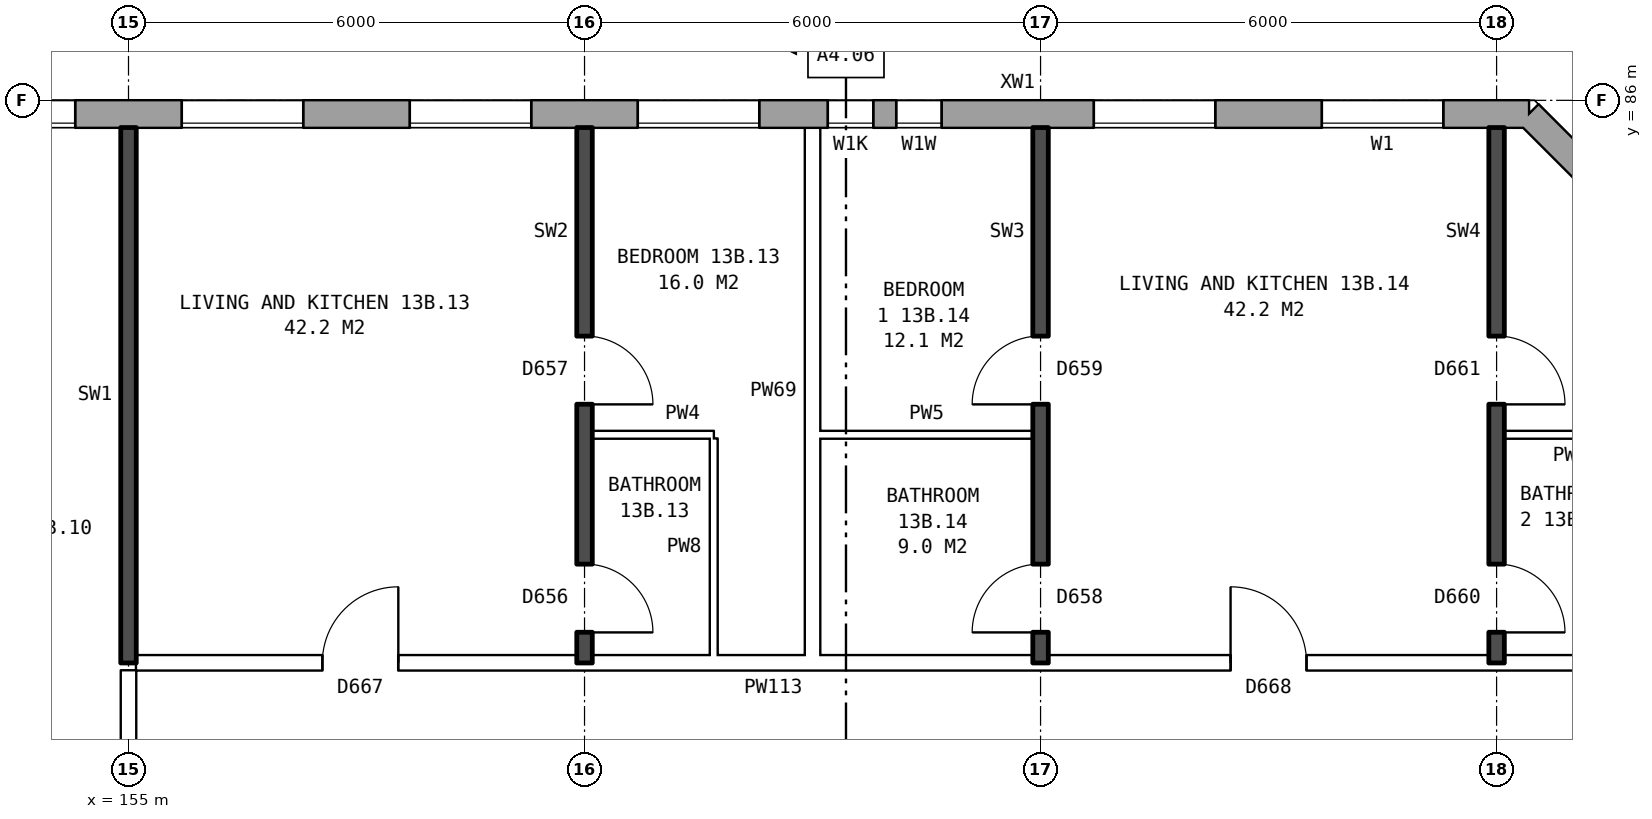
"""IFC4 building model, lengths in metres.
Left out: names, types, materials, properties, quantities, classifications, styles, units other than length and angle.
Written with IfcOpenShell. Run it as: python <this file> out.ifc"""

import sys

from ifc_helpers import new_model, si_unit, direction, frame, frame_2d, origin, place, context, subcontext, project, spatial, rectangle, extrude, element, fill, save


model = new_model("IFC4")
c1 = context("Model", 3, precision=1e-05, world=origin(), true_north=direction((0.0, 1.0)))
c2 = subcontext(c1, "Body", "Model", "MODEL_VIEW")
j1 = project(units=[si_unit("LENGTHUNIT", "METRE"), si_unit("PLANEANGLEUNIT", "RADIAN")], contexts=[c1])
p1 = place(None, origin())
s1 = spatial("IfcSite", under=j1, at=p1, CompositionType="ELEMENT")
p2 = place(p1, origin())
s2 = spatial("IfcBuilding", under=s1, at=p2, CompositionType="ELEMENT")
p3 = place(p2, frame((0.0, 0.0, 50.5)))
s3 = spatial("IfcBuildingStorey", under=s2, at=p3, CompositionType="ELEMENT", Elevation=50.5)
p4 = place(p3, frame((176.32, 82.925, 0.0), z_axis=(0.0, 0.0, 1.0), x_axis=(-0.707106781187, 0.707106781187, 0.0)))
e1 = element("IfcWall", 1, at=p4, inside=s3, PredefinedType="STANDARD", context=c2, shape_type="SweptSolid", body=[
    extrude(rectangle(XDim=4.094, YDim=0.36, at=frame_2d((2.047, 0.0))), origin(), (0.0, 0.0, 1.0), 2.85),
])
p5 = place(p4, frame((1.247, 0.0, 0.8)))
e2 = element("IfcOpeningElement", 2, at=p5, cuts=e1, PredefinedType="OPENING", context=c2, shape_type="SweptSolid", body=[
    extrude(rectangle(XDim=1.6, YDim=1.8, at=frame_2d((0.8, 0.9))), frame((0.0, 0.19, 0.0), z_axis=(0.0, -1.0, 0.0), x_axis=(1.0, 0.0, 0.0)), (0.0, 0.0, 1.0), 0.38),
])
p6 = place(p3, frame((173.425, 85.82, 0.0), z_axis=(0.0, 0.0, 1.0), x_axis=(-1.0, 0.0, 0.0)))
e3 = element("IfcWall", 3, at=p6, inside=s3, PredefinedType="STANDARD", context=c2, shape_type="SweptSolid", body=[
    extrude(rectangle(XDim=39.351, YDim=0.36, at=frame_2d((19.675, 0.0))), origin(), (0.0, 0.0, 1.0), 2.85),
])
p7 = place(p6, frame((1.125, 0.0, 0.8)))
e4 = element("IfcOpeningElement", 4, at=p7, cuts=e3, PredefinedType="OPENING", context=c2, shape_type="SweptSolid", body=[
    extrude(rectangle(XDim=1.6, YDim=1.8, at=frame_2d((0.8, 0.9))), frame((0.0, 0.19, 0.0), z_axis=(0.0, -1.0, 0.0), x_axis=(1.0, 0.0, 0.0)), (0.0, 0.0, 1.0), 0.38),
])
p8 = place(p6, frame((4.125, 0.0, 0.8)))
e5 = element("IfcOpeningElement", 5, at=p8, cuts=e3, PredefinedType="OPENING", context=c2, shape_type="SweptSolid", body=[
    extrude(rectangle(XDim=1.6, YDim=1.8, at=frame_2d((0.8, 0.9))), frame((0.0, 0.19, 0.0), z_axis=(0.0, -1.0, 0.0), x_axis=(1.0, 0.0, 0.0)), (0.0, 0.0, 1.0), 0.38),
])
p9 = place(p6, frame((7.725, 0.0, 0.8)))
e6 = element("IfcOpeningElement", 6, at=p9, cuts=e3, PredefinedType="OPENING", context=c2, shape_type="SweptSolid", body=[
    extrude(rectangle(XDim=0.6, YDim=0.9, at=frame_2d((0.3, 0.45))), frame((0.0, 0.19, 0.0), z_axis=(0.0, -1.0, 0.0), x_axis=(1.0, 0.0, 0.0)), (0.0, 0.0, 1.0), 0.38),
])
p10 = place(p6, frame((10.125, 0.0, 0.8)))
e7 = element("IfcOpeningElement", 7, at=p10, cuts=e3, PredefinedType="OPENING", context=c2, shape_type="SweptSolid", body=[
    extrude(rectangle(XDim=1.6, YDim=1.8, at=frame_2d((0.8, 0.9))), frame((0.0, 0.19, 0.0), z_axis=(0.0, -1.0, 0.0), x_axis=(1.0, 0.0, 0.0)), (0.0, 0.0, 1.0), 0.38),
])
p11 = place(p6, frame((13.125, 0.0, 0.8)))
e8 = element("IfcOpeningElement", 8, at=p11, cuts=e3, PredefinedType="OPENING", context=c2, shape_type="SweptSolid", body=[
    extrude(rectangle(XDim=1.6, YDim=1.8, at=frame_2d((0.8, 0.9))), frame((0.0, 0.19, 0.0), z_axis=(0.0, -1.0, 0.0), x_axis=(1.0, 0.0, 0.0)), (0.0, 0.0, 1.0), 0.38),
])
p12 = place(p6, frame((16.125, 0.0, 0.8)))
e9 = element("IfcOpeningElement", 9, at=p12, cuts=e3, PredefinedType="OPENING", context=c2, shape_type="SweptSolid", body=[
    extrude(rectangle(XDim=1.6, YDim=1.8, at=frame_2d((0.8, 0.9))), frame((0.0, 0.19, 0.0), z_axis=(0.0, -1.0, 0.0), x_axis=(1.0, 0.0, 0.0)), (0.0, 0.0, 1.0), 0.38),
])
p13 = place(p6, frame((19.125, 0.0, 0.8)))
e10 = element("IfcOpeningElement", 10, at=p13, cuts=e3, PredefinedType="OPENING", context=c2, shape_type="SweptSolid", body=[
    extrude(rectangle(XDim=1.6, YDim=1.8, at=frame_2d((0.8, 0.9))), frame((0.0, 0.19, 0.0), z_axis=(0.0, -1.0, 0.0), x_axis=(1.0, 0.0, 0.0)), (0.0, 0.0, 1.0), 0.38),
])
p14 = place(p6, frame((22.125, 0.0, 0.8)))
e11 = element("IfcOpeningElement", 11, at=p14, cuts=e3, PredefinedType="OPENING", context=c2, shape_type="SweptSolid", body=[
    extrude(rectangle(XDim=1.6, YDim=1.8, at=frame_2d((0.8, 0.9))), frame((0.0, 0.19, 0.0), z_axis=(0.0, -1.0, 0.0), x_axis=(1.0, 0.0, 0.0)), (0.0, 0.0, 1.0), 0.38),
])
p15 = place(p6, frame((25.125, 0.0, 0.8)))
e12 = element("IfcOpeningElement", 12, at=p15, cuts=e3, PredefinedType="OPENING", context=c2, shape_type="SweptSolid", body=[
    extrude(rectangle(XDim=1.6, YDim=1.8, at=frame_2d((0.8, 0.9))), frame((0.0, 0.19, 0.0), z_axis=(0.0, -1.0, 0.0), x_axis=(1.0, 0.0, 0.0)), (0.0, 0.0, 1.0), 0.38),
])
p16 = place(p6, frame((28.125, 0.0, 0.8)))
e13 = element("IfcOpeningElement", 13, at=p16, cuts=e3, PredefinedType="OPENING", context=c2, shape_type="SweptSolid", body=[
    extrude(rectangle(XDim=1.6, YDim=1.8, at=frame_2d((0.8, 0.9))), frame((0.0, 0.19, 0.0), z_axis=(0.0, -1.0, 0.0), x_axis=(1.0, 0.0, 0.0)), (0.0, 0.0, 1.0), 0.38),
])
p17 = place(p6, frame((30.625, 0.0, 0.8)))
e14 = element("IfcOpeningElement", 14, at=p17, cuts=e3, PredefinedType="OPENING", context=c2, shape_type="SweptSolid", body=[
    extrude(rectangle(XDim=1.0, YDim=0.9, at=frame_2d((0.5, 0.45))), frame((0.0, 0.19, 0.0), z_axis=(0.0, -1.0, 0.0), x_axis=(1.0, 0.0, 0.0)), (0.0, 0.0, 1.0), 0.38),
])
p18 = place(p6, frame((34.125, 0.0, 0.8)))
e15 = element("IfcOpeningElement", 15, at=p18, cuts=e3, PredefinedType="OPENING", context=c2, shape_type="SweptSolid", body=[
    extrude(rectangle(XDim=1.6, YDim=1.8, at=frame_2d((0.8, 0.9))), frame((0.0, 0.19, 0.0), z_axis=(0.0, -1.0, 0.0), x_axis=(1.0, 0.0, 0.0)), (0.0, 0.0, 1.0), 0.38),
])
p19 = place(p6, frame((37.125, 0.0, 0.8)))
e16 = element("IfcOpeningElement", 16, at=p19, cuts=e3, PredefinedType="OPENING", context=c2, shape_type="SweptSolid", body=[
    extrude(rectangle(XDim=1.6, YDim=1.8, at=frame_2d((0.8, 0.9))), frame((0.0, 0.19, 0.0), z_axis=(0.0, -1.0, 0.0), x_axis=(1.0, 0.0, 0.0)), (0.0, 0.0, 1.0), 0.38),
])
p20 = place(p6, frame((8.625, 0.0, 0.8)))
e17 = element("IfcOpeningElement", 17, at=p20, cuts=e3, PredefinedType="OPENING", context=c2, shape_type="SweptSolid", body=[
    extrude(rectangle(XDim=0.6, YDim=1.5, at=frame_2d((0.3, 0.75))), frame((0.0, 0.19, 0.0), z_axis=(0.0, -1.0, 0.0), x_axis=(1.0, 0.0, 0.0)), (0.0, 0.0, 1.0), 0.38),
])
p21 = place(p6, frame((32.875, 0.0, 1.7)))
e18 = element("IfcOpeningElement", 18, at=p21, cuts=e3, PredefinedType="OPENING", context=c2, shape_type="SweptSolid", body=[
    extrude(rectangle(XDim=0.8, YDim=0.9, at=frame_2d((0.4, 0.45))), frame((0.0, 0.19, 0.0), z_axis=(0.0, -1.0, 0.0), x_axis=(1.0, 0.0, 0.0)), (0.0, 0.0, 1.0), 0.38),
])
p22 = place(p3, frame((155.1, 78.6, 0.0), z_axis=(0.0, 0.0, 1.0), x_axis=(1.0, 0.0, 0.0)))
e19 = element("IfcWall", 19, at=p22, inside=s3, PredefinedType="PARTITIONING", context=c2, shape_type="SweptSolid", body=[
    extrude(rectangle(XDim=21.04, YDim=0.2, at=frame_2d((10.52, 0.0))), origin(), (0.0, 0.0, 1.0), 2.85),
])
p23 = place(p22, frame((2.45, 0.0, 0.0)))
e20 = element("IfcOpeningElement", 20, at=p23, cuts=e19, PredefinedType="OPENING", context=c2, shape_type="SweptSolid", body=[
    extrude(rectangle(XDim=1.0, YDim=2.1, at=frame_2d((0.5, 1.05))), frame((0.0, 0.11, 0.0), z_axis=(0.0, -1.0, 0.0), x_axis=(1.0, 0.0, 0.0)), (0.0, 0.0, 1.0), 0.22),
])
p24 = place(p22, frame((14.4, 0.0, 0.0)))
e21 = element("IfcOpeningElement", 21, at=p24, cuts=e19, PredefinedType="OPENING", context=c2, shape_type="SweptSolid", body=[
    extrude(rectangle(XDim=1.0, YDim=2.1, at=frame_2d((0.5, 1.05))), frame((0.0, 0.11, 0.0), z_axis=(0.0, -1.0, 0.0), x_axis=(1.0, 0.0, 0.0)), (0.0, 0.0, 1.0), 0.22),
])
p25 = place(p3, frame((161.1, 81.6, 0.0), z_axis=(0.0, 0.0, 1.0), x_axis=(1.0, 0.0, 0.0)))
e22 = element("IfcWall", 22, at=p25, inside=s3, PredefinedType="PARTITIONING", context=c2, shape_type="SweptSolid", body=[
    extrude(rectangle(XDim=1.6, YDim=0.1, at=frame_2d((0.8, 0.0))), origin(), (0.0, 0.0, 1.0), 2.85),
])
p26 = place(p3, frame((164.1, 81.6, 0.0), z_axis=(0.0, 0.0, 1.0), x_axis=(1.0, 0.0, 0.0)))
e23 = element("IfcWall", 23, at=p26, inside=s3, PredefinedType="PARTITIONING", context=c2, shape_type="SweptSolid", body=[
    extrude(rectangle(XDim=2.8, YDim=0.1, at=frame_2d((1.4, 0.0))), origin(), (0.0, 0.0, 1.0), 2.85),
])
p27 = place(p3, frame((173.1, 81.6, 0.0), z_axis=(0.0, 0.0, 1.0), x_axis=(1.0, 0.0, 0.0)))
e24 = element("IfcWall", 24, at=p27, inside=s3, PredefinedType="PARTITIONING", context=c2, shape_type="SweptSolid", body=[
    extrude(rectangle(XDim=1.74, YDim=0.1, at=frame_2d((0.87, 0.0))), origin(), (0.0, 0.0, 1.0), 2.85),
])
p28 = place(p3, frame((155.0, 76.3, 0.0), z_axis=(0.0, 0.0, 1.0), x_axis=(0.0, 1.0, 0.0)))
e25 = element("IfcWall", 25, at=p28, inside=s3, PredefinedType="PARTITIONING", context=c2, shape_type="SweptSolid", body=[
    extrude(rectangle(XDim=2.2, YDim=0.2, at=frame_2d((1.1, 0.0))), origin(), (0.0, 0.0, 1.0), 2.85),
])
p29 = place(p3, frame((155.0, 78.6, 0.0), z_axis=(0.0, 0.0, 1.0), x_axis=(0.0, 1.0, 0.0)))
e26 = element("IfcWall", 26, at=p29, inside=s3, PredefinedType="SOLIDWALL", context=c2, shape_type="SweptSolid", body=[
    extrude(rectangle(XDim=7.04, YDim=0.2, at=frame_2d((3.52, 0.0))), origin(), (0.0, 0.0, 1.0), 2.85),
])
p30 = place(p3, frame((161.0, 78.6, 0.0), z_axis=(0.0, 0.0, 1.0), x_axis=(0.0, 1.0, 0.0)))
e27 = element("IfcWall", 27, at=p30, inside=s3, PredefinedType="SOLIDWALL", context=c2, shape_type="SweptSolid", body=[
    extrude(rectangle(XDim=7.04, YDim=0.2, at=frame_2d((3.52, 0.0))), origin(), (0.0, 0.0, 1.0), 2.85),
])
p31 = place(p30, frame((3.4, 0.0, 0.0)))
e28 = element("IfcOpeningElement", 28, at=p31, cuts=e27, PredefinedType="OPENING", context=c2, shape_type="SweptSolid", body=[
    extrude(rectangle(XDim=0.9, YDim=2.1, at=frame_2d((0.45, 1.05))), frame((0.0, 0.11, 0.0), z_axis=(0.0, -1.0, 0.0), x_axis=(1.0, 0.0, 0.0)), (0.0, 0.0, 1.0), 0.22),
])
p32 = place(p30, frame((0.4, 0.0, 0.0)))
e29 = element("IfcOpeningElement", 29, at=p32, cuts=e27, PredefinedType="OPENING", context=c2, shape_type="SweptSolid", body=[
    extrude(rectangle(XDim=0.9, YDim=2.1, at=frame_2d((0.45, 1.05))), frame((0.0, 0.11, 0.0), z_axis=(0.0, -1.0, 0.0), x_axis=(1.0, 0.0, 0.0)), (0.0, 0.0, 1.0), 0.22),
])
p33 = place(p3, frame((162.7, 78.7, 0.0), z_axis=(0.0, 0.0, 1.0), x_axis=(0.0, 1.0, 0.0)))
e30 = element("IfcWall", 30, at=p33, inside=s3, PredefinedType="PARTITIONING", context=c2, shape_type="SweptSolid", body=[
    extrude(rectangle(XDim=2.85, YDim=0.1, at=frame_2d((1.425, 0.0))), origin(), (0.0, 0.0, 1.0), 2.85),
])
p34 = place(p3, frame((164.0, 78.7, 0.0), z_axis=(0.0, 0.0, 1.0), x_axis=(0.0, 1.0, 0.0)))
e31 = element("IfcWall", 31, at=p34, inside=s3, PredefinedType="PARTITIONING", context=c2, shape_type="SweptSolid", body=[
    extrude(rectangle(XDim=6.94, YDim=0.2, at=frame_2d((3.47, 0.0))), origin(), (0.0, 0.0, 1.0), 2.85),
])
p35 = place(p3, frame((167.0, 78.6, 0.0), z_axis=(0.0, 0.0, 1.0), x_axis=(0.0, 1.0, 0.0)))
e32 = element("IfcWall", 32, at=p35, inside=s3, PredefinedType="SOLIDWALL", context=c2, shape_type="SweptSolid", body=[
    extrude(rectangle(XDim=7.04, YDim=0.2, at=frame_2d((3.52, 0.0))), origin(), (0.0, 0.0, 1.0), 2.85),
])
p36 = place(p35, frame((3.4, 0.0, 0.0)))
e33 = element("IfcOpeningElement", 33, at=p36, cuts=e32, PredefinedType="OPENING", context=c2, shape_type="SweptSolid", body=[
    extrude(rectangle(XDim=0.9, YDim=2.1, at=frame_2d((0.45, 1.05))), frame((0.0, 0.11, 0.0), z_axis=(0.0, -1.0, 0.0), x_axis=(1.0, 0.0, 0.0)), (0.0, 0.0, 1.0), 0.22),
])
p37 = place(p35, frame((0.4, 0.0, 0.0)))
e34 = element("IfcOpeningElement", 34, at=p37, cuts=e32, PredefinedType="OPENING", context=c2, shape_type="SweptSolid", body=[
    extrude(rectangle(XDim=0.9, YDim=2.1, at=frame_2d((0.45, 1.05))), frame((0.0, 0.11, 0.0), z_axis=(0.0, -1.0, 0.0), x_axis=(1.0, 0.0, 0.0)), (0.0, 0.0, 1.0), 0.22),
])
p38 = place(p3, frame((173.0, 78.6, 0.0), z_axis=(0.0, 0.0, 1.0), x_axis=(0.0, 1.0, 0.0)))
e35 = element("IfcWall", 35, at=p38, inside=s3, PredefinedType="SOLIDWALL", context=c2, shape_type="SweptSolid", body=[
    extrude(rectangle(XDim=7.04, YDim=0.2, at=frame_2d((3.52, 0.0))), origin(), (0.0, 0.0, 1.0), 2.85),
])
p39 = place(p38, frame((3.4, 0.0, 0.0)))
e36 = element("IfcOpeningElement", 36, at=p39, cuts=e35, PredefinedType="OPENING", context=c2, shape_type="SweptSolid", body=[
    extrude(rectangle(XDim=0.9, YDim=2.1, at=frame_2d((0.45, 1.05))), frame((0.0, 0.11, 0.0), z_axis=(0.0, -1.0, 0.0), x_axis=(1.0, 0.0, 0.0)), (0.0, 0.0, 1.0), 0.22),
])
p40 = place(p38, frame((0.4, 0.0, 0.0)))
e37 = element("IfcOpeningElement", 37, at=p40, cuts=e35, PredefinedType="OPENING", context=c2, shape_type="SweptSolid", body=[
    extrude(rectangle(XDim=0.9, YDim=2.1, at=frame_2d((0.45, 1.05))), frame((0.0, 0.11, 0.0), z_axis=(0.0, -1.0, 0.0), x_axis=(1.0, 0.0, 0.0)), (0.0, 0.0, 1.0), 0.22),
])
p41 = place(p7, origin())
e38 = element("IfcWindow", 38, at=p41, inside=s3, PartitioningType="SINGLE_PANEL", PredefinedType="WINDOW", context=c2, shape_type="SweptSolid", body=[
    extrude(rectangle(XDim=1.6, YDim=1.8, at=frame_2d((0.8, 0.9))), frame((0.0, 0.15, 0.0), z_axis=(0.0, -1.0, 0.0), x_axis=(1.0, 0.0, 0.0)), (0.0, 0.0, 1.0), 0.06),
])
fill(e4, e38)
p42 = place(p8, origin())
e39 = element("IfcWindow", 39, at=p42, inside=s3, PartitioningType="SINGLE_PANEL", PredefinedType="WINDOW", context=c2, shape_type="SweptSolid", body=[
    extrude(rectangle(XDim=1.6, YDim=1.8, at=frame_2d((0.8, 0.9))), frame((0.0, 0.15, 0.0), z_axis=(0.0, -1.0, 0.0), x_axis=(1.0, 0.0, 0.0)), (0.0, 0.0, 1.0), 0.06),
])
fill(e5, e39)
p43 = place(p9, origin())
e40 = element("IfcWindow", 40, at=p43, inside=s3, PartitioningType="SINGLE_PANEL", PredefinedType="WINDOW", context=c2, shape_type="SweptSolid", body=[
    extrude(rectangle(XDim=0.6, YDim=0.9, at=frame_2d((0.3, 0.45))), frame((0.0, 0.15, 0.0), z_axis=(0.0, -1.0, 0.0), x_axis=(1.0, 0.0, 0.0)), (0.0, 0.0, 1.0), 0.06),
])
fill(e6, e40)
p44 = place(p10, origin())
e41 = element("IfcWindow", 41, at=p44, inside=s3, PartitioningType="SINGLE_PANEL", PredefinedType="WINDOW", context=c2, shape_type="SweptSolid", body=[
    extrude(rectangle(XDim=1.6, YDim=1.8, at=frame_2d((0.8, 0.9))), frame((0.0, 0.15, 0.0), z_axis=(0.0, -1.0, 0.0), x_axis=(1.0, 0.0, 0.0)), (0.0, 0.0, 1.0), 0.06),
])
fill(e7, e41)
p45 = place(p11, origin())
e42 = element("IfcWindow", 42, at=p45, inside=s3, PartitioningType="SINGLE_PANEL", PredefinedType="WINDOW", context=c2, shape_type="SweptSolid", body=[
    extrude(rectangle(XDim=1.6, YDim=1.8, at=frame_2d((0.8, 0.9))), frame((0.0, 0.15, 0.0), z_axis=(0.0, -1.0, 0.0), x_axis=(1.0, 0.0, 0.0)), (0.0, 0.0, 1.0), 0.06),
])
fill(e8, e42)
p46 = place(p12, origin())
e43 = element("IfcWindow", 43, at=p46, inside=s3, PartitioningType="SINGLE_PANEL", PredefinedType="WINDOW", context=c2, shape_type="SweptSolid", body=[
    extrude(rectangle(XDim=1.6, YDim=1.8, at=frame_2d((0.8, 0.9))), frame((0.0, 0.15, 0.0), z_axis=(0.0, -1.0, 0.0), x_axis=(1.0, 0.0, 0.0)), (0.0, 0.0, 1.0), 0.06),
])
fill(e9, e43)
p47 = place(p13, origin())
e44 = element("IfcWindow", 44, at=p47, inside=s3, PartitioningType="SINGLE_PANEL", PredefinedType="WINDOW", context=c2, shape_type="SweptSolid", body=[
    extrude(rectangle(XDim=1.6, YDim=1.8, at=frame_2d((0.8, 0.9))), frame((0.0, 0.15, 0.0), z_axis=(0.0, -1.0, 0.0), x_axis=(1.0, 0.0, 0.0)), (0.0, 0.0, 1.0), 0.06),
])
fill(e10, e44)
p48 = place(p31, frame((0.9, 0.0, 0.0), z_axis=(0.0, 0.0, 1.0), x_axis=(-1.0, 0.0, 0.0)))
e45 = element("IfcDoor", 45, at=p48, inside=s3, OperationType="SINGLE_SWING_RIGHT", PredefinedType="DOOR", context=c2, shape_type="SweptSolid", body=[
    extrude(rectangle(XDim=0.9, YDim=2.1, at=frame_2d((0.45, 1.05))), frame((0.0, 0.025, 0.0), z_axis=(0.0, -1.0, 0.0), x_axis=(1.0, 0.0, 0.0)), (0.0, 0.0, 1.0), 0.05),
])
fill(e28, e45)
p49 = place(p23, origin())
e46 = element("IfcDoor", 46, at=p49, inside=s3, OperationType="SINGLE_SWING_RIGHT", PredefinedType="DOOR", context=c2, shape_type="SweptSolid", body=[
    extrude(rectangle(XDim=1.0, YDim=2.1, at=frame_2d((0.5, 1.05))), frame((0.0, 0.025, 0.0), z_axis=(0.0, -1.0, 0.0), x_axis=(1.0, 0.0, 0.0)), (0.0, 0.0, 1.0), 0.05),
])
fill(e20, e46)
p50 = place(p32, frame((0.9, 0.0, 0.0), z_axis=(0.0, 0.0, 1.0), x_axis=(-1.0, 0.0, 0.0)))
e47 = element("IfcDoor", 47, at=p50, inside=s3, OperationType="SINGLE_SWING_RIGHT", PredefinedType="DOOR", context=c2, shape_type="SweptSolid", body=[
    extrude(rectangle(XDim=0.9, YDim=2.1, at=frame_2d((0.45, 1.05))), frame((0.0, 0.025, 0.0), z_axis=(0.0, -1.0, 0.0), x_axis=(1.0, 0.0, 0.0)), (0.0, 0.0, 1.0), 0.05),
])
fill(e29, e47)
p51 = place(p36, origin())
e48 = element("IfcDoor", 48, at=p51, inside=s3, OperationType="SINGLE_SWING_LEFT", PredefinedType="DOOR", context=c2, shape_type="SweptSolid", body=[
    extrude(rectangle(XDim=0.9, YDim=2.1, at=frame_2d((0.45, 1.05))), frame((0.0, 0.025, 0.0), z_axis=(0.0, -1.0, 0.0), x_axis=(1.0, 0.0, 0.0)), (0.0, 0.0, 1.0), 0.05),
])
fill(e33, e48)
p52 = place(p39, frame((0.9, 0.0, 0.0), z_axis=(0.0, 0.0, 1.0), x_axis=(-1.0, 0.0, 0.0)))
e49 = element("IfcDoor", 49, at=p52, inside=s3, OperationType="SINGLE_SWING_RIGHT", PredefinedType="DOOR", context=c2, shape_type="SweptSolid", body=[
    extrude(rectangle(XDim=0.9, YDim=2.1, at=frame_2d((0.45, 1.05))), frame((0.0, 0.025, 0.0), z_axis=(0.0, -1.0, 0.0), x_axis=(1.0, 0.0, 0.0)), (0.0, 0.0, 1.0), 0.05),
])
fill(e36, e49)
p53 = place(p24, origin())
e50 = element("IfcDoor", 50, at=p53, inside=s3, OperationType="SINGLE_SWING_LEFT", PredefinedType="DOOR", context=c2, shape_type="SweptSolid", body=[
    extrude(rectangle(XDim=1.0, YDim=2.1, at=frame_2d((0.5, 1.05))), frame((0.0, 0.025, 0.0), z_axis=(0.0, -1.0, 0.0), x_axis=(1.0, 0.0, 0.0)), (0.0, 0.0, 1.0), 0.05),
])
fill(e21, e50)
p54 = place(p37, origin())
e51 = element("IfcDoor", 51, at=p54, inside=s3, OperationType="SINGLE_SWING_LEFT", PredefinedType="DOOR", context=c2, shape_type="SweptSolid", body=[
    extrude(rectangle(XDim=0.9, YDim=2.1, at=frame_2d((0.45, 1.05))), frame((0.0, 0.025, 0.0), z_axis=(0.0, -1.0, 0.0), x_axis=(1.0, 0.0, 0.0)), (0.0, 0.0, 1.0), 0.05),
])
fill(e34, e51)
p55 = place(p40, frame((0.9, 0.0, 0.0), z_axis=(0.0, 0.0, 1.0), x_axis=(-1.0, 0.0, 0.0)))
e52 = element("IfcDoor", 52, at=p55, inside=s3, OperationType="SINGLE_SWING_RIGHT", PredefinedType="DOOR", context=c2, shape_type="SweptSolid", body=[
    extrude(rectangle(XDim=0.9, YDim=2.1, at=frame_2d((0.45, 1.05))), frame((0.0, 0.025, 0.0), z_axis=(0.0, -1.0, 0.0), x_axis=(1.0, 0.0, 0.0)), (0.0, 0.0, 1.0), 0.05),
])
fill(e37, e52)
p56 = place(p20, origin())
e53 = element("IfcWindow", 53, at=p56, inside=s3, PartitioningType="SINGLE_PANEL", PredefinedType="WINDOW", context=c2, shape_type="SweptSolid", body=[
    extrude(rectangle(XDim=0.6, YDim=1.5, at=frame_2d((0.3, 0.75))), frame((0.0, 0.15, 0.0), z_axis=(0.0, -1.0, 0.0), x_axis=(1.0, 0.0, 0.0)), (0.0, 0.0, 1.0), 0.06),
])
fill(e17, e53)
save(model, sys.argv[1])
